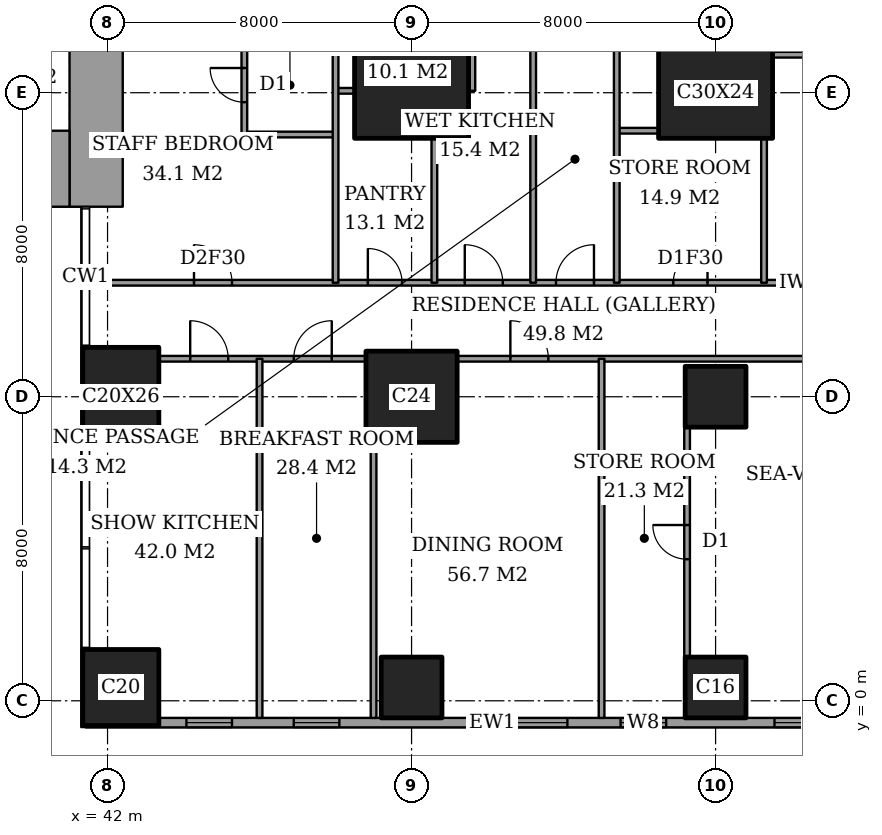
"""IFC4 building model, lengths in metres.
Left out: names, types, materials, properties, quantities, classifications, styles, units other than length and angle.
Written with IfcOpenShell. Run it as: python <this file> out.ifc"""

import sys

from ifc_helpers import new_model, si_unit, direction, frame, frame_2d, origin, origin_2d, place, context, subcontext, project, spatial, rectangle, extrude, element, fill, save


model = new_model("IFC4")
c1 = context("Model", 3, precision=1e-05, world=origin(), true_north=direction((0.0, 1.0)))
c2 = subcontext(c1, "Body", "Model", "MODEL_VIEW")
j1 = project(units=[si_unit("LENGTHUNIT", "METRE"), si_unit("PLANEANGLEUNIT", "RADIAN")], contexts=[c1])
p1 = place(None, origin())
s1 = spatial("IfcSite", under=j1, at=p1, CompositionType="ELEMENT")
p2 = place(p1, origin())
s2 = spatial("IfcBuilding", under=s1, at=p2, CompositionType="ELEMENT")
p3 = place(p2, frame((0.0, 0.0, 237.6)))
s3 = spatial("IfcBuildingStorey", under=s2, at=p3, CompositionType="ELEMENT", Elevation=237.6)
p4 = place(p3, frame((42.35, 0.35, 0.0), z_axis=(0.0, 0.0, 1.0), x_axis=(1.0, 0.0, 0.0)))
e1 = element("IfcColumn", 1, at=p4, inside=s3, PredefinedType="COLUMN", context=c2, shape_type="SweptSolid", body=[
    extrude(rectangle(XDim=2.0, YDim=2.0, at=origin_2d()), origin(), (0.0, 0.0, 1.0), 3.6),
])
p5 = place(p3, frame((42.35, 8.0, 0.0), z_axis=(0.0, 0.0, 1.0), x_axis=(1.0, 0.0, 0.0)))
e2 = element("IfcColumn", 2, at=p5, inside=s3, PredefinedType="COLUMN", context=c2, shape_type="SweptSolid", body=[
    extrude(rectangle(XDim=2.0, YDim=2.6, at=origin_2d()), origin(), (0.0, 0.0, 1.0), 3.6),
])
p6 = place(p3, frame((50.0, 0.35, 0.0), z_axis=(0.0, 0.0, 1.0), x_axis=(1.0, 0.0, 0.0)))
e3 = element("IfcColumn", 3, at=p6, inside=s3, PredefinedType="COLUMN", context=c2, shape_type="SweptSolid", body=[
    extrude(rectangle(XDim=1.6, YDim=1.6, at=origin_2d()), origin(), (0.0, 0.0, 1.0), 3.6),
])
p7 = place(p3, frame((50.0, 8.0, 0.0), z_axis=(0.0, 0.0, 1.0), x_axis=(1.0, 0.0, 0.0)))
e4 = element("IfcColumn", 4, at=p7, inside=s3, PredefinedType="COLUMN", context=c2, shape_type="SweptSolid", body=[
    extrude(rectangle(XDim=2.4, YDim=2.4, at=origin_2d()), origin(), (0.0, 0.0, 1.0), 3.6),
])
p8 = place(p3, frame((50.0, 16.0, 0.0), z_axis=(0.0, 0.0, 1.0), x_axis=(1.0, 0.0, 0.0)))
e5 = element("IfcColumn", 5, at=p8, inside=s3, PredefinedType="COLUMN", context=c2, shape_type="SweptSolid", body=[
    extrude(rectangle(XDim=3.0, YDim=2.4, at=origin_2d()), origin(), (0.0, 0.0, 1.0), 3.6),
])
for number, where, z_axis, x_axis in (
    (6, (58.0, 0.35, 0.0), (0.0, 0.0, 1.0), (1.0, 0.0, 0.0)),
    (7, (58.0, 8.0, 0.0), (0.0, 0.0, 1.0), (1.0, 0.0, 0.0)),
):
    element("IfcColumn", number, at=place(p3, frame(where, z_axis=z_axis, x_axis=x_axis)), inside=s3, PredefinedType="COLUMN", context=c2, shape_type="SweptSolid", body=[
        extrude(rectangle(XDim=1.6, YDim=1.6, at=origin_2d()), origin(), (0.0, 0.0, 1.0), 3.6),
    ])
p9 = place(p3, frame((58.0, 16.0, 0.0), z_axis=(0.0, 0.0, 1.0), x_axis=(1.0, 0.0, 0.0)))
e8 = element("IfcColumn", 8, at=p9, inside=s3, PredefinedType="COLUMN", context=c2, shape_type="SweptSolid", body=[
    extrude(rectangle(XDim=3.0, YDim=2.4, at=origin_2d()), origin(), (0.0, 0.0, 1.0), 3.6),
])
p10 = place(p3, frame((37.85, 14.0, 0.0), z_axis=(0.0, 0.0, 1.0), x_axis=(1.0, 0.0, 0.0)))
e9 = element("IfcWall", 9, at=p10, inside=s3, PredefinedType="SHEAR", context=c2, shape_type="SweptSolid", body=[
    extrude(rectangle(XDim=3.15, YDim=2.0, at=frame_2d((1.575, 0.0))), origin(), (0.0, 0.0, 1.0), 3.6),
])
p11 = place(p3, frame((41.7, 13.0, 0.0), z_axis=(0.0, 0.0, 1.0), x_axis=(0.0, 1.0, 0.0)))
e10 = element("IfcWall", 10, at=p11, inside=s3, PredefinedType="SHEAR", context=c2, shape_type="SweptSolid", body=[
    extrude(rectangle(XDim=11.85, YDim=1.4, at=frame_2d((5.925, 0.0))), origin(), (0.0, 0.0, 1.0), 3.6),
])
p12 = place(p11, frame((7.5, 0.0, 0.0)))
e11 = element("IfcOpeningElement", 11, at=p12, cuts=e10, PredefinedType="OPENING", context=c2, shape_type="SweptSolid", body=[
    extrude(rectangle(XDim=1.8, YDim=2.4, at=frame_2d((0.9, 1.2))), frame((0.0, 0.71, 0.0), z_axis=(0.0, -1.0, 0.0), x_axis=(1.0, 0.0, 0.0)), (0.0, 0.0, 1.0), 1.42),
])
p13 = place(p3, frame((41.425, -0.575, 0.0), z_axis=(0.0, 0.0, 1.0), x_axis=(1.0, 0.0, 0.0)))
e12 = element("IfcWall", 12, at=p13, inside=s3, PredefinedType="SOLIDWALL", context=c2, shape_type="SweptSolid", body=[
    extrude(rectangle(XDim=21.4, YDim=0.25, at=frame_2d((10.7, 0.0))), origin(), (0.0, 0.0, 1.0), 3.6),
])
p14 = place(p13, frame((2.65, 0.0, 0.6)))
e13 = element("IfcOpeningElement", 13, at=p14, cuts=e12, PredefinedType="OPENING", context=c2, shape_type="SweptSolid", body=[
    extrude(rectangle(XDim=1.2, YDim=2.0, at=frame_2d((0.6, 1.0))), frame((0.0, 0.135, 0.0), z_axis=(0.0, -1.0, 0.0), x_axis=(1.0, 0.0, 0.0)), (0.0, 0.0, 1.0), 0.27),
])
p15 = place(p13, frame((5.475, 0.0, 0.6)))
e14 = element("IfcOpeningElement", 14, at=p15, cuts=e12, PredefinedType="OPENING", context=c2, shape_type="SweptSolid", body=[
    extrude(rectangle(XDim=1.2, YDim=2.0, at=frame_2d((0.6, 1.0))), frame((0.0, 0.135, 0.0), z_axis=(0.0, -1.0, 0.0), x_axis=(1.0, 0.0, 0.0)), (0.0, 0.0, 1.0), 0.27),
])
p16 = place(p13, frame((10.275, 0.0, 0.6)))
e15 = element("IfcOpeningElement", 15, at=p16, cuts=e12, PredefinedType="OPENING", context=c2, shape_type="SweptSolid", body=[
    extrude(rectangle(XDim=2.4, YDim=2.0, at=frame_2d((1.2, 1.0))), frame((0.0, 0.135, 0.0), z_axis=(0.0, -1.0, 0.0), x_axis=(1.0, 0.0, 0.0)), (0.0, 0.0, 1.0), 0.27),
])
p17 = place(p13, frame((14.075, 0.0, 0.6)))
e16 = element("IfcOpeningElement", 16, at=p17, cuts=e12, PredefinedType="OPENING", context=c2, shape_type="SweptSolid", body=[
    extrude(rectangle(XDim=1.2, YDim=2.0, at=frame_2d((0.6, 1.0))), frame((0.0, 0.135, 0.0), z_axis=(0.0, -1.0, 0.0), x_axis=(1.0, 0.0, 0.0)), (0.0, 0.0, 1.0), 0.27),
])
p18 = place(p13, frame((18.125, 0.0, 0.6)))
e17 = element("IfcOpeningElement", 17, at=p18, cuts=e12, PredefinedType="OPENING", context=c2, shape_type="SweptSolid", body=[
    extrude(rectangle(XDim=2.4, YDim=2.0, at=frame_2d((1.2, 1.0))), frame((0.0, 0.135, 0.0), z_axis=(0.0, -1.0, 0.0), x_axis=(1.0, 0.0, 0.0)), (0.0, 0.0, 1.0), 0.27),
])
p19 = place(p3, frame((43.35, 9.0, 0.0), z_axis=(0.0, 0.0, 1.0), x_axis=(1.0, 0.0, 0.0)))
e18 = element("IfcWall", 18, at=p19, inside=s3, PredefinedType="PARTITIONING", context=c2, shape_type="SweptSolid", body=[
    extrude(rectangle(XDim=5.45, YDim=0.15, at=frame_2d((2.725, 0.0))), origin(), (0.0, 0.0, 1.0), 3.35),
])
p20 = place(p19, frame((3.55, 0.0, 0.0)))
e19 = element("IfcOpeningElement", 19, at=p20, cuts=e18, PredefinedType="OPENING", context=c2, shape_type="SweptSolid", body=[
    extrude(rectangle(XDim=1.0, YDim=2.1, at=frame_2d((0.5, 1.05))), frame((0.0, 0.085, 0.0), z_axis=(0.0, -1.0, 0.0), x_axis=(1.0, 0.0, 0.0)), (0.0, 0.0, 1.0), 0.17),
])
p21 = place(p19, frame((0.825, 0.0, 0.0)))
e20 = element("IfcOpeningElement", 20, at=p21, cuts=e18, PredefinedType="OPENING", context=c2, shape_type="SweptSolid", body=[
    extrude(rectangle(XDim=1.0, YDim=2.1, at=frame_2d((0.5, 1.05))), frame((0.0, 0.085, 0.0), z_axis=(0.0, -1.0, 0.0), x_axis=(1.0, 0.0, 0.0)), (0.0, 0.0, 1.0), 0.17),
])
p22 = place(p3, frame((51.2, 9.0, 0.0), z_axis=(0.0, 0.0, 1.0), x_axis=(1.0, 0.0, 0.0)))
e21 = element("IfcWall", 21, at=p22, inside=s3, PredefinedType="PARTITIONING", context=c2, shape_type="SweptSolid", body=[
    extrude(rectangle(XDim=15.25, YDim=0.15, at=frame_2d((7.625, 0.0))), origin(), (0.0, 0.0, 1.0), 3.35),
])
p23 = place(p22, frame((10.15, 0.0, 0.0)))
e22 = element("IfcOpeningElement", 22, at=p23, cuts=e21, PredefinedType="OPENING", context=c2, shape_type="SweptSolid", body=[
    extrude(rectangle(XDim=1.0, YDim=2.1, at=frame_2d((0.5, 1.05))), frame((0.0, 0.085, 0.0), z_axis=(0.0, -1.0, 0.0), x_axis=(1.0, 0.0, 0.0)), (0.0, 0.0, 1.0), 0.17),
])
p24 = place(p22, frame((1.4, 0.0, 0.0)))
e23 = element("IfcOpeningElement", 23, at=p24, cuts=e21, PredefinedType="OPENING", context=c2, shape_type="SweptSolid", body=[
    extrude(rectangle(XDim=1.0, YDim=2.1, at=frame_2d((0.5, 1.05))), frame((0.0, 0.085, 0.0), z_axis=(0.0, -1.0, 0.0), x_axis=(1.0, 0.0, 0.0)), (0.0, 0.0, 1.0), 0.17),
])
p25 = place(p3, frame((41.439, 11.0, 0.0), z_axis=(0.0, 0.0, 1.0), x_axis=(1.0, 0.0, 0.0)))
e24 = element("IfcWall", 24, at=p25, inside=s3, PredefinedType="PARTITIONING", context=c2, shape_type="SweptSolid", body=[
    extrude(rectangle(XDim=25.011, YDim=0.15, at=frame_2d((12.505, 0.0))), origin(), (0.0, 0.0, 1.0), 3.35),
])
p26 = place(p25, frame((12.361, 0.0, 0.0)))
e25 = element("IfcOpeningElement", 25, at=p26, cuts=e24, PredefinedType="OPENING", context=c2, shape_type="SweptSolid", body=[
    extrude(rectangle(XDim=1.0, YDim=2.1, at=frame_2d((0.5, 1.05))), frame((0.0, 0.085, 0.0), z_axis=(0.0, -1.0, 0.0), x_axis=(1.0, 0.0, 0.0)), (0.0, 0.0, 1.0), 0.17),
])
p27 = place(p25, frame((20.924, 0.0, 0.0)))
e26 = element("IfcOpeningElement", 26, at=p27, cuts=e24, PredefinedType="OPENING", context=c2, shape_type="SweptSolid", body=[
    extrude(rectangle(XDim=1.0, YDim=2.1, at=frame_2d((0.5, 1.05))), frame((0.0, 0.085, 0.0), z_axis=(0.0, -1.0, 0.0), x_axis=(1.0, 0.0, 0.0)), (0.0, 0.0, 1.0), 0.17),
])
p28 = place(p25, frame((15.448, 0.0, 0.0)))
e27 = element("IfcOpeningElement", 27, at=p28, cuts=e24, PredefinedType="OPENING", context=c2, shape_type="SweptSolid", body=[
    extrude(rectangle(XDim=0.9, YDim=2.1, at=frame_2d((0.45, 1.05))), frame((0.0, 0.085, 0.0), z_axis=(0.0, -1.0, 0.0), x_axis=(1.0, 0.0, 0.0)), (0.0, 0.0, 1.0), 0.17),
])
p29 = place(p25, frame((9.961, 0.0, 0.0)))
e28 = element("IfcOpeningElement", 28, at=p29, cuts=e24, PredefinedType="OPENING", context=c2, shape_type="SweptSolid", body=[
    extrude(rectangle(XDim=1.0, YDim=2.1, at=frame_2d((0.5, 1.05))), frame((0.0, 0.085, 0.0), z_axis=(0.0, -1.0, 0.0), x_axis=(1.0, 0.0, 0.0)), (0.0, 0.0, 1.0), 0.17),
])
p30 = place(p25, frame((7.411, 0.0, 0.0)))
e29 = element("IfcOpeningElement", 29, at=p30, cuts=e24, PredefinedType="OPENING", context=c2, shape_type="SweptSolid", body=[
    extrude(rectangle(XDim=0.9, YDim=2.1, at=frame_2d((0.45, 1.05))), frame((0.0, 0.085, 0.0), z_axis=(0.0, -1.0, 0.0), x_axis=(1.0, 0.0, 0.0)), (0.0, 0.0, 1.0), 0.17),
])
p31 = place(p25, frame((2.836, 0.0, 0.0)))
e30 = element("IfcOpeningElement", 30, at=p31, cuts=e24, PredefinedType="OPENING", context=c2, shape_type="SweptSolid", body=[
    extrude(rectangle(XDim=1.0, YDim=2.1, at=frame_2d((0.5, 1.05))), frame((0.0, 0.085, 0.0), z_axis=(0.0, -1.0, 0.0), x_axis=(1.0, 0.0, 0.0)), (0.0, 0.0, 1.0), 0.17),
])
p32 = place(p3, frame((45.6, 14.9, 0.0), z_axis=(0.0, 0.0, 1.0), x_axis=(1.0, 0.0, 0.0)))
e31 = element("IfcWall", 31, at=p32, inside=s3, PredefinedType="PARTITIONING", context=c2, shape_type="SweptSolid", body=[
    extrude(rectangle(XDim=2.4, YDim=0.15, at=frame_2d((1.2, 0.0))), origin(), (0.0, 0.0, 1.0), 3.35),
])
p33 = place(p3, frame((55.4, 15.0, 0.0), z_axis=(0.0, 0.0, 1.0), x_axis=(1.0, 0.0, 0.0)))
e32 = element("IfcWall", 32, at=p33, inside=s3, PredefinedType="PARTITIONING", context=c2, shape_type="SweptSolid", body=[
    extrude(rectangle(XDim=1.1, YDim=0.15, at=frame_2d((0.55, 0.0))), origin(), (0.0, 0.0, 1.0), 3.35),
])
p34 = place(p3, frame((48.0, 16.05, 0.0), z_axis=(0.0, 0.0, 1.0), x_axis=(1.0, 0.0, 0.0)))
e33 = element("IfcWall", 33, at=p34, inside=s3, PredefinedType="PARTITIONING", context=c2, shape_type="SweptSolid", body=[
    extrude(rectangle(XDim=0.5, YDim=0.15, at=frame_2d((0.25, 0.0))), origin(), (0.0, 0.0, 1.0), 2.634),
])
p35 = place(p3, frame((59.5, 17.0, 0.0), z_axis=(0.0, 0.0, 1.0), x_axis=(1.0, 0.0, 0.0)))
e34 = element("IfcWall", 34, at=p35, inside=s3, PredefinedType="PARTITIONING", context=c2, shape_type="SweptSolid", body=[
    extrude(rectangle(XDim=6.95, YDim=0.15, at=frame_2d((3.475, 0.0))), origin(), (0.0, 0.0, 1.0), 3.35),
])
p36 = place(p3, frame((45.6, 14.9, 0.0), z_axis=(0.0, 0.0, 1.0), x_axis=(0.0, 1.0, 0.0)))
e35 = element("IfcWall", 35, at=p36, inside=s3, PredefinedType="PARTITIONING", context=c2, shape_type="SweptSolid", body=[
    extrude(rectangle(XDim=2.6, YDim=0.15, at=frame_2d((1.3, 0.0))), origin(), (0.0, 0.0, 1.0), 3.35),
])
p37 = place(p36, frame((0.85, 0.0, 0.0)))
e36 = element("IfcOpeningElement", 36, at=p37, cuts=e35, PredefinedType="OPENING", context=c2, shape_type="SweptSolid", body=[
    extrude(rectangle(XDim=0.9, YDim=2.1, at=frame_2d((0.45, 1.05))), frame((0.0, 0.085, 0.0), z_axis=(0.0, -1.0, 0.0), x_axis=(1.0, 0.0, 0.0)), (0.0, 0.0, 1.0), 0.17),
])
p38 = place(p3, frame((46.0, -0.45, 0.0), z_axis=(0.0, 0.0, 1.0), x_axis=(0.0, 1.0, 0.0)))
e37 = element("IfcWall", 37, at=p38, inside=s3, PredefinedType="PARTITIONING", context=c2, shape_type="SweptSolid", body=[
    extrude(rectangle(XDim=9.45, YDim=0.15, at=frame_2d((4.725, 0.0))), origin(), (0.0, 0.0, 1.0), 3.35),
])
p39 = place(p3, frame((48.0, 11.0, 0.0), z_axis=(0.0, 0.0, 1.0), x_axis=(0.0, 1.0, 0.0)))
e38 = element("IfcWall", 38, at=p39, inside=s3, PredefinedType="PARTITIONING", context=c2, shape_type="SweptSolid", body=[
    extrude(rectangle(XDim=6.5, YDim=0.15, at=frame_2d((3.25, 0.0))), origin(), (0.0, 0.0, 1.0), 3.35),
])
p40 = place(p3, frame((49.0, -0.45, 0.0), z_axis=(0.0, 0.0, 1.0), x_axis=(0.0, 1.0, 0.0)))
e39 = element("IfcWall", 39, at=p40, inside=s3, PredefinedType="PARTITIONING", context=c2, shape_type="SweptSolid", body=[
    extrude(rectangle(XDim=7.25, YDim=0.15, at=frame_2d((3.625, 0.0))), origin(), (0.0, 0.0, 1.0), 3.35),
])
p41 = place(p3, frame((50.6, 11.0, 0.0), z_axis=(0.0, 0.0, 1.0), x_axis=(0.0, 1.0, 0.0)))
e40 = element("IfcWall", 40, at=p41, inside=s3, PredefinedType="PARTITIONING", context=c2, shape_type="SweptSolid", body=[
    extrude(rectangle(XDim=3.8, YDim=0.15, at=frame_2d((1.9, 0.0))), origin(), (0.0, 0.0, 1.0), 3.35),
])
p42 = place(p3, frame((51.6, 16.05, 0.0), z_axis=(0.0, 0.0, 1.0), x_axis=(0.0, 1.0, 0.0)))
e41 = element("IfcWall", 41, at=p42, inside=s3, PredefinedType="PARTITIONING", context=c2, shape_type="SweptSolid", body=[
    extrude(rectangle(XDim=1.45, YDim=0.15, at=frame_2d((0.725, 0.0))), origin(), (0.0, 0.0, 1.0), 3.35),
])
p43 = place(p3, frame((53.2, 11.0, 0.0), z_axis=(0.0, 0.0, 1.0), x_axis=(0.0, 1.0, 0.0)))
e42 = element("IfcWall", 42, at=p43, inside=s3, PredefinedType="PARTITIONING", context=c2, shape_type="SweptSolid", body=[
    extrude(rectangle(XDim=6.5, YDim=0.15, at=frame_2d((3.25, 0.0))), origin(), (0.0, 0.0, 1.0), 3.35),
])
p44 = place(p3, frame((55.0, -0.45, 0.0), z_axis=(0.0, 0.0, 1.0), x_axis=(0.0, 1.0, 0.0)))
e43 = element("IfcWall", 43, at=p44, inside=s3, PredefinedType="PARTITIONING", context=c2, shape_type="SweptSolid", body=[
    extrude(rectangle(XDim=9.45, YDim=0.15, at=frame_2d((4.725, 0.0))), origin(), (0.0, 0.0, 1.0), 3.35),
])
p45 = place(p3, frame((55.4, 11.0, 0.0), z_axis=(0.0, 0.0, 1.0), x_axis=(0.0, 1.0, 0.0)))
e44 = element("IfcWall", 44, at=p45, inside=s3, PredefinedType="PARTITIONING", context=c2, shape_type="SweptSolid", body=[
    extrude(rectangle(XDim=10.6, YDim=0.15, at=frame_2d((5.3, 0.0))), origin(), (0.0, 0.0, 1.0), 3.35),
])
p46 = place(p45, frame((8.05, 0.0, 0.0)))
e45 = element("IfcOpeningElement", 45, at=p46, cuts=e44, PredefinedType="OPENING", context=c2, shape_type="SweptSolid", body=[
    extrude(rectangle(XDim=1.0, YDim=2.1, at=frame_2d((0.5, 1.05))), frame((0.0, 0.085, 0.0), z_axis=(0.0, -1.0, 0.0), x_axis=(1.0, 0.0, 0.0)), (0.0, 0.0, 1.0), 0.17),
])
p47 = place(p3, frame((57.25, 1.15, 0.0), z_axis=(0.0, 0.0, 1.0), x_axis=(0.0, 1.0, 0.0)))
e46 = element("IfcWall", 46, at=p47, inside=s3, PredefinedType="PARTITIONING", context=c2, shape_type="SweptSolid", body=[
    extrude(rectangle(XDim=6.05, YDim=0.15, at=frame_2d((3.025, 0.0))), origin(), (0.0, 0.0, 1.0), 3.35),
])
p48 = place(p47, frame((2.575, 0.0, 0.0)))
e47 = element("IfcOpeningElement", 47, at=p48, cuts=e46, PredefinedType="OPENING", context=c2, shape_type="SweptSolid", body=[
    extrude(rectangle(XDim=0.9, YDim=2.1, at=frame_2d((0.45, 1.05))), frame((0.0, 0.085, 0.0), z_axis=(0.0, -1.0, 0.0), x_axis=(1.0, 0.0, 0.0)), (0.0, 0.0, 1.0), 0.17),
])
p49 = place(p3, frame((59.275, 11.0, 0.0), z_axis=(0.0, 0.0, 1.0), x_axis=(0.0, 1.0, 0.0)))
e48 = element("IfcWall", 48, at=p49, inside=s3, PredefinedType="PARTITIONING", context=c2, shape_type="SweptSolid", body=[
    extrude(rectangle(XDim=3.8, YDim=0.15, at=frame_2d((1.9, 0.0))), origin(), (0.0, 0.0, 1.0), 3.35),
])
p50 = place(p14, origin())
e49 = element("IfcWindow", 49, at=p50, inside=s3, PartitioningType="SINGLE_PANEL", PredefinedType="WINDOW", context=c2, shape_type="SweptSolid", body=[
    extrude(rectangle(XDim=1.2, YDim=2.0, at=frame_2d((0.6, 1.0))), frame((0.0, 0.03, 0.0), z_axis=(0.0, -1.0, 0.0), x_axis=(1.0, 0.0, 0.0)), (0.0, 0.0, 1.0), 0.06),
])
fill(e13, e49)
p51 = place(p15, origin())
e50 = element("IfcWindow", 50, at=p51, inside=s3, PartitioningType="SINGLE_PANEL", PredefinedType="WINDOW", context=c2, shape_type="SweptSolid", body=[
    extrude(rectangle(XDim=1.2, YDim=2.0, at=frame_2d((0.6, 1.0))), frame((0.0, 0.03, 0.0), z_axis=(0.0, -1.0, 0.0), x_axis=(1.0, 0.0, 0.0)), (0.0, 0.0, 1.0), 0.06),
])
fill(e14, e50)
p52 = place(p16, origin())
e51 = element("IfcWindow", 51, at=p52, inside=s3, PartitioningType="SINGLE_PANEL", PredefinedType="WINDOW", context=c2, shape_type="SweptSolid", body=[
    extrude(rectangle(XDim=2.4, YDim=2.0, at=frame_2d((1.2, 1.0))), frame((0.0, 0.03, 0.0), z_axis=(0.0, -1.0, 0.0), x_axis=(1.0, 0.0, 0.0)), (0.0, 0.0, 1.0), 0.06),
])
fill(e15, e51)
p53 = place(p17, origin())
e52 = element("IfcWindow", 52, at=p53, inside=s3, PartitioningType="SINGLE_PANEL", PredefinedType="WINDOW", context=c2, shape_type="SweptSolid", body=[
    extrude(rectangle(XDim=1.2, YDim=2.0, at=frame_2d((0.6, 1.0))), frame((0.0, 0.03, 0.0), z_axis=(0.0, -1.0, 0.0), x_axis=(1.0, 0.0, 0.0)), (0.0, 0.0, 1.0), 0.06),
])
fill(e16, e52)
p54 = place(p18, origin())
e53 = element("IfcWindow", 53, at=p54, inside=s3, PartitioningType="SINGLE_PANEL", PredefinedType="WINDOW", context=c2, shape_type="SweptSolid", body=[
    extrude(rectangle(XDim=2.4, YDim=2.0, at=frame_2d((1.2, 1.0))), frame((0.0, 0.03, 0.0), z_axis=(0.0, -1.0, 0.0), x_axis=(1.0, 0.0, 0.0)), (0.0, 0.0, 1.0), 0.06),
])
fill(e17, e53)
p55 = place(p48, origin())
e54 = element("IfcDoor", 54, at=p55, inside=s3, OperationType="SINGLE_SWING_LEFT", PredefinedType="DOOR", context=c2, shape_type="SweptSolid", body=[
    extrude(rectangle(XDim=0.9, YDim=2.1, at=frame_2d((0.45, 1.05))), frame((0.0, 0.025, 0.0), z_axis=(0.0, -1.0, 0.0), x_axis=(1.0, 0.0, 0.0)), (0.0, 0.0, 1.0), 0.05),
])
fill(e47, e54)
p56 = place(p24, origin())
e55 = element("IfcDoor", 55, at=p56, inside=s3, OperationType="SINGLE_SWING_RIGHT", PredefinedType="DOOR", context=c2, shape_type="SweptSolid", body=[
    extrude(rectangle(XDim=1.0, YDim=2.1, at=frame_2d((0.5, 1.05))), frame((0.0, 0.025, 0.0), z_axis=(0.0, -1.0, 0.0), x_axis=(1.0, 0.0, 0.0)), (0.0, 0.0, 1.0), 0.05),
])
fill(e23, e55)
p57 = place(p20, origin())
e56 = element("IfcDoor", 56, at=p57, inside=s3, OperationType="SINGLE_SWING_LEFT", PredefinedType="DOOR", context=c2, shape_type="SweptSolid", body=[
    extrude(rectangle(XDim=1.0, YDim=2.1, at=frame_2d((0.5, 1.05))), frame((0.0, 0.025, 0.0), z_axis=(0.0, -1.0, 0.0), x_axis=(1.0, 0.0, 0.0)), (0.0, 0.0, 1.0), 0.05),
])
fill(e19, e56)
p58 = place(p21, origin())
e57 = element("IfcDoor", 57, at=p58, inside=s3, OperationType="SINGLE_SWING_RIGHT", PredefinedType="DOOR", context=c2, shape_type="SweptSolid", body=[
    extrude(rectangle(XDim=1.0, YDim=2.1, at=frame_2d((0.5, 1.05))), frame((0.0, 0.025, 0.0), z_axis=(0.0, -1.0, 0.0), x_axis=(1.0, 0.0, 0.0)), (0.0, 0.0, 1.0), 0.05),
])
fill(e20, e57)
p59 = place(p26, origin())
e58 = element("IfcDoor", 58, at=p59, inside=s3, OperationType="SINGLE_SWING_LEFT", PredefinedType="DOOR", context=c2, shape_type="SweptSolid", body=[
    extrude(rectangle(XDim=1.0, YDim=2.1, at=frame_2d((0.5, 1.05))), frame((0.0, 0.025, 0.0), z_axis=(0.0, -1.0, 0.0), x_axis=(1.0, 0.0, 0.0)), (0.0, 0.0, 1.0), 0.05),
])
fill(e25, e58)
p60 = place(p28, origin())
e59 = element("IfcDoor", 59, at=p60, inside=s3, OperationType="SINGLE_SWING_LEFT", PredefinedType="DOOR", context=c2, shape_type="SweptSolid", body=[
    extrude(rectangle(XDim=0.9, YDim=2.1, at=frame_2d((0.45, 1.05))), frame((0.0, 0.025, 0.0), z_axis=(0.0, -1.0, 0.0), x_axis=(1.0, 0.0, 0.0)), (0.0, 0.0, 1.0), 0.05),
])
fill(e27, e59)
p61 = place(p29, origin())
e60 = element("IfcDoor", 60, at=p61, inside=s3, OperationType="SINGLE_SWING_RIGHT", PredefinedType="DOOR", context=c2, shape_type="SweptSolid", body=[
    extrude(rectangle(XDim=1.0, YDim=2.1, at=frame_2d((0.5, 1.05))), frame((0.0, 0.025, 0.0), z_axis=(0.0, -1.0, 0.0), x_axis=(1.0, 0.0, 0.0)), (0.0, 0.0, 1.0), 0.05),
])
fill(e28, e60)
p62 = place(p30, origin())
e61 = element("IfcDoor", 61, at=p62, inside=s3, OperationType="SINGLE_SWING_RIGHT", PredefinedType="DOOR", context=c2, shape_type="SweptSolid", body=[
    extrude(rectangle(XDim=0.9, YDim=2.1, at=frame_2d((0.45, 1.05))), frame((0.0, 0.025, 0.0), z_axis=(0.0, -1.0, 0.0), x_axis=(1.0, 0.0, 0.0)), (0.0, 0.0, 1.0), 0.05),
])
fill(e29, e61)
p63 = place(p37, origin())
e62 = element("IfcDoor", 62, at=p63, inside=s3, OperationType="SINGLE_SWING_LEFT", PredefinedType="DOOR", context=c2, shape_type="SweptSolid", body=[
    extrude(rectangle(XDim=0.9, YDim=2.1, at=frame_2d((0.45, 1.05))), frame((0.0, 0.025, 0.0), z_axis=(0.0, -1.0, 0.0), x_axis=(1.0, 0.0, 0.0)), (0.0, 0.0, 1.0), 0.05),
])
fill(e36, e62)
p64 = place(p31, origin())
e63 = element("IfcDoor", 63, at=p64, inside=s3, OperationType="SINGLE_SWING_RIGHT", PredefinedType="DOOR", context=c2, shape_type="SweptSolid", body=[
    extrude(rectangle(XDim=1.0, YDim=2.1, at=frame_2d((0.5, 1.05))), frame((0.0, 0.025, 0.0), z_axis=(0.0, -1.0, 0.0), x_axis=(1.0, 0.0, 0.0)), (0.0, 0.0, 1.0), 0.05),
])
fill(e30, e63)
save(model, sys.argv[1])
